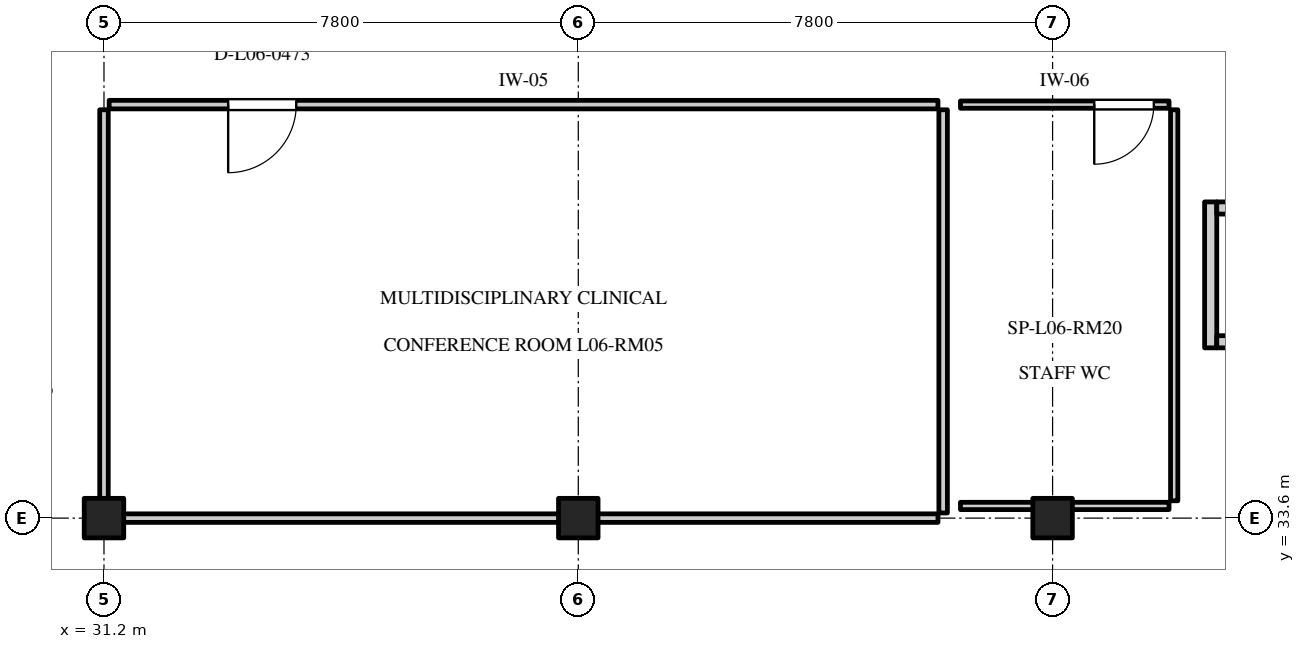
"""IFC4 building model, lengths in metres.
Left out: names, types, materials, properties, quantities, classifications, styles, units other than length and angle.
Written with IfcOpenShell. Run it as: python <this file> out.ifc"""

import sys

from ifc_helpers import new_model, si_unit, direction, frame, frame_2d, origin, origin_2d, place, context, subcontext, project, spatial, rectangle, extrude, element, fill, save


model = new_model("IFC4")
c1 = context("Model", 3, precision=1e-05, world=origin(), true_north=direction((0.0, 1.0)))
c2 = subcontext(c1, "Body", "Model", "MODEL_VIEW")
j1 = project(units=[si_unit("LENGTHUNIT", "METRE"), si_unit("PLANEANGLEUNIT", "RADIAN")], contexts=[c1])
p1 = place(None, origin())
s1 = spatial("IfcSite", under=j1, at=p1, CompositionType="ELEMENT")
p2 = place(p1, origin())
s2 = spatial("IfcBuilding", under=s1, at=p2, CompositionType="ELEMENT")
p3 = place(p2, frame((0.0, 0.0, 26.1)))
s3 = spatial("IfcBuildingStorey", under=s2, at=p3, CompositionType="ELEMENT", Elevation=26.1)
for number, where, z_axis, x_axis in (
    (1, (31.2, 33.6, 0.0), (0.0, 0.0, 1.0), (1.0, 0.0, 0.0)),
    (2, (39.0, 33.6, 0.0), (0.0, 0.0, 1.0), (1.0, 0.0, 0.0)),
    (3, (46.8, 33.6, 0.0), (0.0, 0.0, 1.0), (1.0, 0.0, 0.0)),
):
    element("IfcColumn", number, at=place(p3, frame(where, z_axis=z_axis, x_axis=x_axis)), inside=s3, PredefinedType="COLUMN", context=c2, shape_type="SweptSolid", body=[
        extrude(rectangle(XDim=0.65, YDim=0.65, at=origin_2d()), origin(), (0.0, 0.0, 1.0), 3.6),
    ])
p4 = place(p3, frame((49.4, 36.4, 0.0), z_axis=(0.0, 0.0, 1.0), x_axis=(0.0, 1.0, 0.0)))
e4 = element("IfcWall", 4, at=p4, inside=s3, PredefinedType="STANDARD", context=c2, shape_type="SweptSolid", body=[
    extrude(rectangle(XDim=2.4, YDim=0.2, at=frame_2d((1.2, 0.0))), origin(), (0.0, 0.0, 1.0), 3.3),
])
for number, where, z_axis, x_axis in (
    (5, (49.5, 36.5, 0.0), (0.0, 0.0, 1.0), (1.0, 0.0, 0.0)),
    (6, (49.5, 38.7, 0.0), (0.0, 0.0, 1.0), (1.0, 0.0, 0.0)),
):
    element("IfcWall", number, at=place(p3, frame(where, z_axis=z_axis, x_axis=x_axis)), inside=s3, PredefinedType="STANDARD", context=c2, shape_type="SweptSolid", body=[
        extrude(rectangle(XDim=2.0, YDim=0.2, at=frame_2d((1.0, 0.0))), origin(), (0.0, 0.0, 1.0), 3.3),
    ])
p5 = place(p3, frame((31.285, 40.4, 0.0), z_axis=(0.0, 0.0, 1.0), x_axis=(1.0, 0.0, 0.0)))
e7 = element("IfcWall", 7, at=p5, inside=s3, PredefinedType="PARTITIONING", context=c2, shape_type="SweptSolid", body=[
    extrude(rectangle(XDim=13.63, YDim=0.14, at=frame_2d((6.815, 0.0))), origin(), (0.0, 0.0, 1.0), 3.28),
])
p6 = place(p5, frame((1.957, 0.0, 0.0)))
e8 = element("IfcOpeningElement", 8, at=p6, cuts=e7, PredefinedType="OPENING", context=c2, shape_type="SweptSolid", body=[
    extrude(rectangle(XDim=1.12, YDim=2.2, at=frame_2d((0.56, 1.1))), frame((0.0, 0.082, 0.0), z_axis=(0.0, -1.0, 0.0), x_axis=(1.0, 0.0, 0.0)), (0.0, 0.0, 1.0), 0.164),
])
p7 = place(p3, frame((31.285, 33.6, 0.0), z_axis=(0.0, 0.0, 1.0), x_axis=(1.0, 0.0, 0.0)))
e9 = element("IfcWall", 9, at=p7, inside=s3, PredefinedType="PARTITIONING", context=c2, shape_type="SweptSolid", body=[
    extrude(rectangle(XDim=13.63, YDim=0.14, at=frame_2d((6.815, 0.0))), origin(), (0.0, 0.0, 1.0), 2.65),
])
for number, where, z_axis, x_axis in (
    (10, (31.2, 33.685, 0.0), (0.0, 0.0, 1.0), (0.0, 1.0, 0.0)),
    (11, (45.0, 33.685, 0.0), (0.0, 0.0, 1.0), (0.0, 1.0, 0.0)),
):
    element("IfcWall", number, at=place(p3, frame(where, z_axis=z_axis, x_axis=x_axis)), inside=s3, PredefinedType="PARTITIONING", context=c2, shape_type="SweptSolid", body=[
        extrude(rectangle(XDim=6.63, YDim=0.14, at=frame_2d((3.315, 0.0))), origin(), (0.0, 0.0, 1.0), 3.28),
    ])
p8 = place(p3, frame((45.285, 40.4, 0.0), z_axis=(0.0, 0.0, 1.0), x_axis=(1.0, 0.0, 0.0)))
e12 = element("IfcWall", 12, at=p8, inside=s3, PredefinedType="PARTITIONING", context=c2, shape_type="SweptSolid", body=[
    extrude(rectangle(XDim=3.43, YDim=0.12, at=frame_2d((1.715, 0.0))), origin(), (0.0, 0.0, 1.0), 3.28),
])
p9 = place(p8, frame((2.2, 0.0, 0.0)))
e13 = element("IfcOpeningElement", 13, at=p9, cuts=e12, PredefinedType="OPENING", context=c2, shape_type="SweptSolid", body=[
    extrude(rectangle(XDim=0.98, YDim=2.1, at=frame_2d((0.49, 1.05))), frame((0.0, 0.072, 0.0), z_axis=(0.0, -1.0, 0.0), x_axis=(1.0, 0.0, 0.0)), (0.0, 0.0, 1.0), 0.144),
])
p10 = place(p3, frame((45.285, 33.8, 0.0), z_axis=(0.0, 0.0, 1.0), x_axis=(1.0, 0.0, 0.0)))
e14 = element("IfcWall", 14, at=p10, inside=s3, PredefinedType="PARTITIONING", context=c2, shape_type="SweptSolid", body=[
    extrude(rectangle(XDim=3.43, YDim=0.12, at=frame_2d((1.715, 0.0))), origin(), (0.0, 0.0, 1.0), 2.65),
])
p11 = place(p3, frame((48.8, 33.885, 0.0), z_axis=(0.0, 0.0, 1.0), x_axis=(0.0, 1.0, 0.0)))
e15 = element("IfcWall", 15, at=p11, inside=s3, PredefinedType="PARTITIONING", context=c2, shape_type="SweptSolid", body=[
    extrude(rectangle(XDim=6.43, YDim=0.12, at=frame_2d((3.215, 0.0))), origin(), (0.0, 0.0, 1.0), 3.28),
])
p12 = place(p6, frame((1.12, 0.0, 0.0), z_axis=(0.0, 0.0, 1.0), x_axis=(-1.0, 0.0, 0.0)))
e16 = element("IfcDoor", 16, at=p12, inside=s3, OperationType="SINGLE_SWING_RIGHT", PredefinedType="DOOR", context=c2, shape_type="SweptSolid", body=[
    extrude(rectangle(XDim=1.12, YDim=2.2, at=frame_2d((0.56, 1.1))), frame((0.0, 0.025, 0.0), z_axis=(0.0, -1.0, 0.0), x_axis=(1.0, 0.0, 0.0)), (0.0, 0.0, 1.0), 0.05),
])
fill(e8, e16)
p13 = place(p9, frame((0.98, 0.0, 0.0), z_axis=(0.0, 0.0, 1.0), x_axis=(-1.0, 0.0, 0.0)))
e17 = element("IfcDoor", 17, at=p13, inside=s3, OperationType="SINGLE_SWING_RIGHT", PredefinedType="DOOR", context=c2, shape_type="SweptSolid", body=[
    extrude(rectangle(XDim=0.98, YDim=2.1, at=frame_2d((0.49, 1.05))), frame((0.0, 0.025, 0.0), z_axis=(0.0, -1.0, 0.0), x_axis=(1.0, 0.0, 0.0)), (0.0, 0.0, 1.0), 0.05),
])
fill(e13, e17)
save(model, sys.argv[1])
